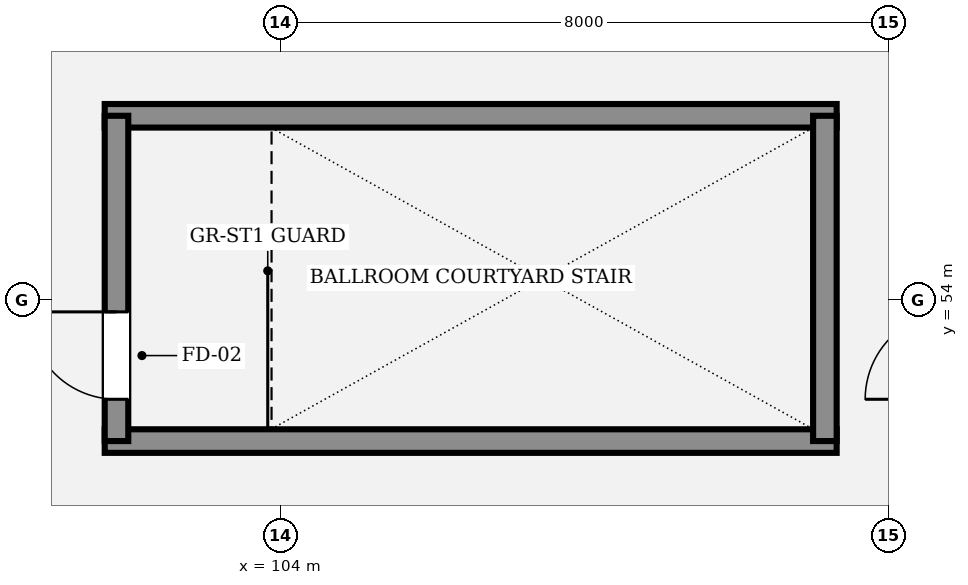
"""IFC4 building model, lengths in metres.
Left out: names, types, materials, properties, quantities, classifications, styles, units other than length and angle.
Written with IfcOpenShell. Run it as: python <this file> out.ifc"""

import sys

from ifc_helpers import new_model, si_unit, direction, frame, frame_2d, origin, place, context, subcontext, project, spatial, rectangle, extrude, element, fill, save


model = new_model("IFC4")
c1 = context("Model", 3, precision=1e-05, world=origin(), true_north=direction((0.0, 1.0)))
c2 = subcontext(c1, "Body", "Model", "MODEL_VIEW")
j1 = project(units=[si_unit("LENGTHUNIT", "METRE"), si_unit("PLANEANGLEUNIT", "RADIAN")], contexts=[c1])
p1 = place(None, origin())
s1 = spatial("IfcSite", under=j1, at=p1, CompositionType="ELEMENT")
p2 = place(p1, origin())
s2 = spatial("IfcBuilding", under=s1, at=p2, CompositionType="ELEMENT")
p3 = place(p2, frame((0.0, 0.0, 16.2)))
s3 = spatial("IfcBuildingStorey", under=s2, at=p3, CompositionType="ELEMENT", Elevation=16.2)
for number, where, z_axis, x_axis in (
    (1, (101.685, 52.14, 0.0), (0.0, 0.0, 1.0), (1.0, 0.0, 0.0)),
    (2, (101.685, 56.42, 0.0), (0.0, 0.0, 1.0), (1.0, 0.0, 0.0)),
):
    element("IfcWall", number, at=place(p3, frame(where, z_axis=z_axis, x_axis=x_axis)), inside=s3, PredefinedType="SHEAR", context=c2, shape_type="SweptSolid", body=[
        extrude(rectangle(XDim=9.63, YDim=0.31, at=frame_2d((4.815, 0.0))), origin(), (0.0, 0.0, 1.0), 4.8),
    ])
p4 = place(p3, frame((101.84, 52.14, 0.0), z_axis=(0.0, 0.0, 1.0), x_axis=(0.0, 1.0, 0.0)))
e3 = element("IfcWall", 3, at=p4, inside=s3, PredefinedType="SHEAR", context=c2, shape_type="SweptSolid", body=[
    extrude(rectangle(XDim=4.28, YDim=0.31, at=frame_2d((2.14, 0.0))), origin(), (0.0, 0.0, 1.0), 4.8),
])
p5 = place(p4, frame((0.55, 0.0, 0.0)))
e4 = element("IfcOpeningElement", 4, at=p5, cuts=e3, PredefinedType="OPENING", context=c2, shape_type="SweptSolid", body=[
    extrude(rectangle(XDim=1.15, YDim=2.2, at=frame_2d((0.575, 1.1))), frame((0.0, 0.165, 0.0), z_axis=(0.0, -1.0, 0.0), x_axis=(1.0, 0.0, 0.0)), (0.0, 0.0, 1.0), 0.33),
])
p6 = place(p3, frame((111.16, 52.14, 0.0), z_axis=(0.0, 0.0, 1.0), x_axis=(0.0, 1.0, 0.0)))
e5 = element("IfcWall", 5, at=p6, inside=s3, PredefinedType="SHEAR", context=c2, shape_type="SweptSolid", body=[
    extrude(rectangle(XDim=4.28, YDim=0.31, at=frame_2d((2.14, 0.0))), origin(), (0.0, 0.0, 1.0), 4.8),
])
p7 = place(p5, origin())
e6 = element("IfcDoor", 6, at=p7, inside=s3, OperationType="SINGLE_SWING_RIGHT", PredefinedType="DOOR", context=c2, shape_type="SweptSolid", body=[
    extrude(rectangle(XDim=1.15, YDim=2.2, at=frame_2d((0.575, 1.1))), frame((0.0, 0.025, 0.0), z_axis=(0.0, -1.0, 0.0), x_axis=(1.0, 0.0, 0.0)), (0.0, 0.0, 1.0), 0.05),
])
fill(e4, e6)
save(model, sys.argv[1])
